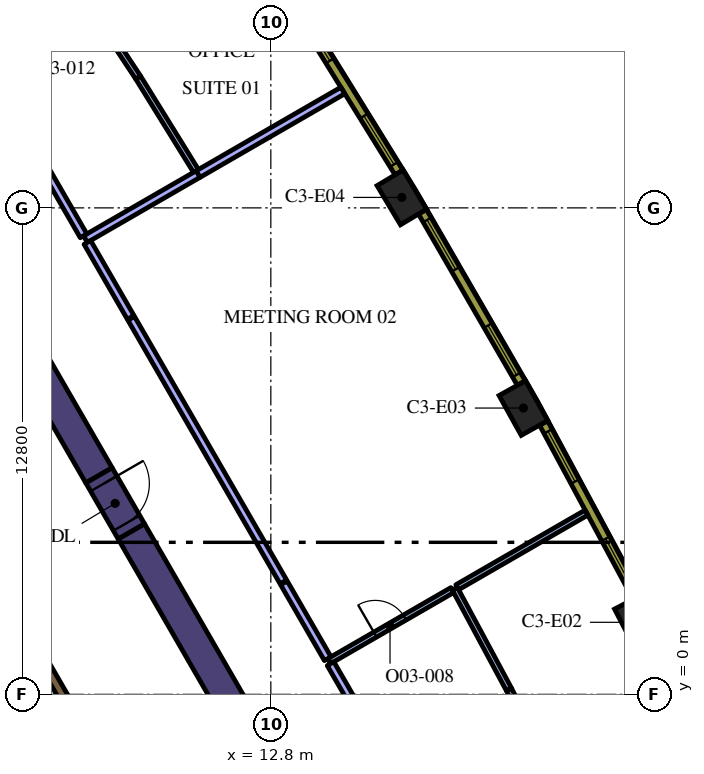
"""IFC4 building model, lengths in metres.
Left out: names, types, materials, properties, quantities, classifications, styles, units other than length and angle.
Written with IfcOpenShell. Run it as: python <this file> out.ifc"""

import sys

from ifc_helpers import new_model, si_unit, direction, frame, frame_2d, origin, origin_2d, place, context, subcontext, project, spatial, rectangle, extrude, element, fill, save


model = new_model("IFC4")
c1 = context("Model", 3, precision=1e-05, world=origin(), true_north=direction((0.0, 1.0)))
c2 = subcontext(c1, "Body", "Model", "MODEL_VIEW")
j1 = project(units=[si_unit("LENGTHUNIT", "METRE"), si_unit("PLANEANGLEUNIT", "RADIAN")], contexts=[c1])
p1 = place(None, origin())
s1 = spatial("IfcSite", under=j1, at=p1, CompositionType="ELEMENT")
p2 = place(p1, origin())
s2 = spatial("IfcBuilding", under=s1, at=p2, CompositionType="ELEMENT")
p3 = place(p2, frame((0.0, 0.0, 175.2)))
s3 = spatial("IfcBuildingStorey", under=s2, at=p3, CompositionType="ELEMENT", Elevation=175.2)
for number, where, z_axis, x_axis in (
    (1, (22.476, 1.896, 0.0), (0.0, 0.0, 1.0), (-0.46, 0.888, 0.0)),
    (2, (19.447, 7.533, 0.0), (0.0, 0.0, 1.0), (-0.487, 0.874, 0.0)),
    (3, (16.247, 13.075, 0.0), (0.0, 0.0, 1.0), (-0.513, 0.858, 0.0)),
):
    element("IfcColumn", number, at=place(p3, frame(where, z_axis=z_axis, x_axis=x_axis)), inside=s3, PredefinedType="COLUMN", context=c2, shape_type="SweptSolid", body=[
        extrude(rectangle(XDim=1.2, YDim=0.8, at=origin_2d()), origin(), (0.0, 0.0, 1.0), 4.2),
    ])
p4 = place(p3, frame((9.129, 4.289, 0.0), z_axis=(0.0, 0.0, 1.0), x_axis=(0.499995742806, -0.866027861663, 0.0)))
e4 = element("IfcWall", 4, at=p4, inside=s3, PredefinedType="SOLIDWALL", context=c2, shape_type="SweptSolid", body=[
    extrude(rectangle(XDim=12.527, YDim=0.8, at=frame_2d((6.264, 0.0))), origin(), (0.0, 0.0, 1.0), 4.2),
])
p5 = place(p3, frame((8.279, 5.761, 0.0), z_axis=(0.0, 0.0, 1.0), x_axis=(-0.500010359015, 0.866019422922, 0.0)))
e5 = element("IfcWall", 5, at=p5, inside=s3, PredefinedType="SOLIDWALL", context=c2, shape_type="SweptSolid", body=[
    extrude(rectangle(XDim=12.528, YDim=0.8, at=frame_2d((6.264, 0.0))), origin(), (0.0, 0.0, 1.0), 4.2),
])
p6 = place(p3, frame((8.565, -2.185, 0.0), z_axis=(0.0, 0.0, 1.0), x_axis=(-0.499997954832, 0.866026584559, 0.0)))
e6 = element("IfcWall", 6, at=p6, inside=s3, PredefinedType="SOLIDWALL", context=c2, shape_type="SweptSolid", body=[
    extrude(rectangle(XDim=12.35, YDim=0.25, at=frame_2d((6.175, 0.0))), origin(), (0.0, 0.0, 1.0), 4.2),
])
p7 = place(p6, frame((0.585, 0.0, 0.0)))
e7 = element("IfcOpeningElement", 7, at=p7, cuts=e6, PredefinedType="OPENING", context=c2, shape_type="SweptSolid", body=[
    extrude(rectangle(XDim=1.1, YDim=2.1, at=frame_2d((0.55, 1.05))), frame((0.0, 0.135, 0.0), z_axis=(0.0, -1.0, 0.0), x_axis=(1.0, 0.0, 0.0)), (0.0, 0.0, 1.0), 0.27),
])
p8 = place(p3, frame((8.279, 5.761, 0.0), z_axis=(0.0, 0.0, 1.0), x_axis=(0.500062241894, -0.865989465428, 0.0)))
e8 = element("IfcWall", 8, at=p8, inside=s3, PredefinedType="SOLIDWALL", context=c2, shape_type="SweptSolid", body=[
    extrude(rectangle(XDim=1.7, YDim=0.8, at=frame_2d((0.85, 0.0))), origin(), (0.0, 0.0, 1.0), 4.2),
])
p9 = place(p8, frame((0.25, 0.0, 0.0)))
e9 = element("IfcOpeningElement", 9, at=p9, cuts=e8, PredefinedType="OPENING", context=c2, shape_type="SweptSolid", body=[
    extrude(rectangle(XDim=1.2, YDim=2.1, at=frame_2d((0.6, 1.05))), frame((0.0, 0.41, 0.0), z_axis=(0.0, -1.0, 0.0), x_axis=(1.0, 0.0, 0.0)), (0.0, 0.0, 1.0), 0.82),
])
p10 = place(p3, frame((19.066, 0.129, 0.0), z_axis=(0.0, 0.0, 1.0), x_axis=(0.446215695511, -0.894925445543, 0.0)))
e10 = element("IfcWall", 10, at=p10, inside=s3, PredefinedType="PARTITIONING", context=c2, shape_type="SweptSolid", body=[
    extrude(rectangle(XDim=3.328, YDim=0.15, at=frame_2d((1.664, 0.0))), origin(), (0.0, 0.0, 1.0), 3.15),
])
p11 = place(p10, frame((1.228, 0.0, 0.0)))
e11 = element("IfcOpeningElement", 11, at=p11, cuts=e10, PredefinedType="OPENING", context=c2, shape_type="SweptSolid", body=[
    extrude(rectangle(XDim=0.9, YDim=2.1, at=frame_2d((0.45, 1.05))), frame((0.0, 0.085, 0.0), z_axis=(0.0, -1.0, 0.0), x_axis=(1.0, 0.0, 0.0)), (0.0, 0.0, 1.0), 0.17),
])
p12 = place(p3, frame((19.066, 0.129, 0.0), z_axis=(0.0, 0.0, 1.0), x_axis=(-0.473359743891, 0.88086920304, 0.0)))
e12 = element("IfcWall", 12, at=p12, inside=s3, PredefinedType="PARTITIONING", context=c2, shape_type="SweptSolid", body=[
    extrude(rectangle(XDim=3.01, YDim=0.15, at=frame_2d((1.505, 0.0))), origin(), (0.0, 0.0, 1.0), 3.15),
])
p13 = place(p3, frame((17.706, 2.819, 0.0), z_axis=(0.0, 0.0, 1.0), x_axis=(0.866023031919, 0.500004108169, 0.0)))
e13 = element("IfcWall", 13, at=p13, inside=s3, PredefinedType="PARTITIONING", context=c2, shape_type="SweptSolid", body=[
    extrude(rectangle(XDim=3.927, YDim=0.15, at=frame_2d((1.963, 0.0))), origin(), (0.0, 0.0, 1.0), 3.15),
])
p14 = place(p3, frame((14.334, 0.872, 0.0), z_axis=(0.0, 0.0, 1.0), x_axis=(0.866027010039, 0.499997217876, 0.0)))
e14 = element("IfcWall", 14, at=p14, inside=s3, PredefinedType="PARTITIONING", context=c2, shape_type="SweptSolid", body=[
    extrude(rectangle(XDim=3.743, YDim=0.15, at=frame_2d((1.872, 0.0))), origin(), (0.0, 0.0, 1.0), 3.15),
])
p15 = place(p14, frame((1.4, 0.0, 0.0)))
e15 = element("IfcOpeningElement", 15, at=p15, cuts=e14, PredefinedType="OPENING", context=c2, shape_type="SweptSolid", body=[
    extrude(rectangle(XDim=0.9, YDim=2.1, at=frame_2d((0.45, 1.05))), frame((0.0, 0.085, 0.0), z_axis=(0.0, -1.0, 0.0), x_axis=(1.0, 0.0, 0.0)), (0.0, 0.0, 1.0), 0.17),
])
p16 = place(p3, frame((18.489, -6.324, 0.0), z_axis=(0.0, 0.0, 1.0), x_axis=(-0.500003913404, 0.866023144368, 0.0)))
e16 = element("IfcWall", 16, at=p16, inside=s3, PredefinedType="PARTITIONING", context=c2, shape_type="SweptSolid", body=[
    extrude(rectangle(XDim=8.234, YDim=0.2, at=frame_2d((4.117, 0.0))), origin(), (0.0, 0.0, 1.0), 3.15),
])
p17 = place(p3, frame((10.879, 13.685, 0.0), z_axis=(0.0, 0.0, 1.0), x_axis=(0.866035177799, 0.499983070528, 0.0)))
e17 = element("IfcWall", 17, at=p17, inside=s3, PredefinedType="PARTITIONING", context=c2, shape_type="SweptSolid", body=[
    extrude(rectangle(XDim=4.406, YDim=0.2, at=frame_2d((2.203, 0.0))), origin(), (0.0, 0.0, 1.0), 3.15),
])
p18 = place(p3, frame((7.922, 11.978, 0.0), z_axis=(0.0, 0.0, 1.0), x_axis=(0.866008564848, 0.50002916476, 0.0)))
e18 = element("IfcWall", 18, at=p18, inside=s3, PredefinedType="PARTITIONING", context=c2, shape_type="SweptSolid", body=[
    extrude(rectangle(XDim=3.422, YDim=0.2, at=frame_2d((1.711, 0.0))), origin(), (0.0, 0.0, 1.0), 3.15),
])
p19 = place(p3, frame((13.13, 2.958, 0.0), z_axis=(0.0, 0.0, 1.0), x_axis=(-0.499995158272, 0.866028199139, 0.0)))
e19 = element("IfcWall", 19, at=p19, inside=s3, PredefinedType="PARTITIONING", context=c2, shape_type="SweptSolid", body=[
    extrude(rectangle(XDim=8.008, YDim=0.2, at=frame_2d((4.004, 0.0))), origin(), (0.0, 0.0, 1.0), 3.15),
])
p20 = place(p3, frame((9.111, 9.918, 0.0), z_axis=(0.0, 0.0, 1.0), x_axis=(-0.499954382462, 0.86605173948, 0.0)))
e20 = element("IfcWall", 20, at=p20, inside=s3, PredefinedType="PARTITIONING", context=c2, shape_type="SweptSolid", body=[
    extrude(rectangle(XDim=2.278, YDim=0.2, at=frame_2d((1.139, 0.0))), origin(), (0.0, 0.0, 1.0), 3.15),
])
p21 = place(p3, frame((14.297, 0.937, 0.0), z_axis=(0.0, 0.0, 1.0), x_axis=(-0.499970234539, 0.866042588199, 0.0)))
e21 = element("IfcWall", 21, at=p21, inside=s3, PredefinedType="PARTITIONING", context=c2, shape_type="SweptSolid", body=[
    extrude(rectangle(XDim=2.303, YDim=0.2, at=frame_2d((1.151, 0.0))), origin(), (0.0, 0.0, 1.0), 3.15),
])
p22 = place(p3, frame((10.83, 13.772, 0.0), z_axis=(0.0, 0.0, 1.0), x_axis=(-0.526229630206, 0.850342505284, 0.0)))
e22 = element("IfcWall", 22, at=p22, inside=s3, PredefinedType="PARTITIONING", context=c2, shape_type="SweptSolid", body=[
    extrude(rectangle(XDim=2.892, YDim=0.15, at=frame_2d((1.446, 0.0))), origin(), (0.0, 0.0, 1.0), 3.15),
])
p23 = place(p3, frame((7.461, 19.022, 0.0), z_axis=(0.0, 0.0, 1.0), x_axis=(0.551902709159, -0.833908507945, 0.0)))
e23 = element("IfcWall", 23, at=p23, inside=s3, PredefinedType="PARTITIONING", context=c2, shape_type="SweptSolid", body=[
    extrude(rectangle(XDim=3.347, YDim=0.15, at=frame_2d((1.673, 0.0))), origin(), (0.0, 0.0, 1.0), 3.15),
])
p24 = place(p23, frame((1.247, 0.0, 0.0)))
e24 = element("IfcOpeningElement", 24, at=p24, cuts=e23, PredefinedType="OPENING", context=c2, shape_type="SweptSolid", body=[
    extrude(rectangle(XDim=0.9, YDim=2.1, at=frame_2d((0.45, 1.05))), frame((0.0, 0.085, 0.0), z_axis=(0.0, -1.0, 0.0), x_axis=(1.0, 0.0, 0.0)), (0.0, 0.0, 1.0), 0.17),
])
p25 = place(p3, frame((7.872, 12.064, 0.0), z_axis=(0.0, 0.0, 1.0), x_axis=(-0.499995192696, 0.866028179265, 0.0)))
e25 = element("IfcWall", 25, at=p25, inside=s3, PredefinedType="PARTITIONING", context=c2, shape_type="SweptSolid", body=[
    extrude(rectangle(XDim=8.239, YDim=0.2, at=frame_2d((4.12, 0.0))), origin(), (0.0, 0.0, 1.0), 3.15),
])
p26 = place(p25, frame((3.6, 0.0, 0.0)))
e26 = element("IfcOpeningElement", 26, at=p26, cuts=e25, PredefinedType="OPENING", context=c2, shape_type="SweptSolid", body=[
    extrude(rectangle(XDim=1.0, YDim=2.1, at=frame_2d((0.5, 1.05))), frame((0.0, 0.11, 0.0), z_axis=(0.0, -1.0, 0.0), x_axis=(1.0, 0.0, 0.0)), (0.0, 0.0, 1.0), 0.22),
])
p27 = place(p3, frame((22.44, 2.555, 0.0), z_axis=(0.0, 0.0, 1.0), x_axis=(-0.473349833294, 0.880874528704, 0.0)))
e27 = element("IfcWall", 27, at=p27, inside=s3, PredefinedType="SOLIDWALL", context=c2, shape_type="SweptSolid", body=[
    extrude(rectangle(XDim=5.204, YDim=0.24, at=frame_2d((2.602, 0.0))), origin(), (0.0, 0.0, 1.0), 3.95),
])
p28 = place(p27, frame((0.248, 0.0, 0.9)))
e28 = element("IfcOpeningElement", 28, at=p28, cuts=e27, PredefinedType="OPENING", context=c2, shape_type="SweptSolid", body=[
    extrude(rectangle(XDim=1.5, YDim=2.55, at=frame_2d((0.75, 1.275))), frame((0.0, 0.13, 0.0), z_axis=(0.0, -1.0, 0.0), x_axis=(1.0, 0.0, 0.0)), (0.0, 0.0, 1.0), 0.26),
])
p29 = place(p27, frame((3.455, 0.0, 0.9)))
e29 = element("IfcOpeningElement", 29, at=p29, cuts=e27, PredefinedType="OPENING", context=c2, shape_type="SweptSolid", body=[
    extrude(rectangle(XDim=1.5, YDim=2.55, at=frame_2d((0.75, 1.275))), frame((0.0, 0.13, 0.0), z_axis=(0.0, -1.0, 0.0), x_axis=(1.0, 0.0, 0.0)), (0.0, 0.0, 1.0), 0.26),
])
p30 = place(p3, frame((19.391, 8.191, 0.0), z_axis=(0.0, 0.0, 1.0), x_axis=(-0.500009456303, 0.866019944116, 0.0)))
e30 = element("IfcWall", 30, at=p30, inside=s3, PredefinedType="SOLIDWALL", context=c2, shape_type="SweptSolid", body=[
    extrude(rectangle(XDim=5.204, YDim=0.24, at=frame_2d((2.602, 0.0))), origin(), (0.0, 0.0, 1.0), 3.95),
])
p31 = place(p30, frame((0.248, 0.0, 0.9)))
e31 = element("IfcOpeningElement", 31, at=p31, cuts=e30, PredefinedType="OPENING", context=c2, shape_type="SweptSolid", body=[
    extrude(rectangle(XDim=1.5, YDim=2.55, at=frame_2d((0.75, 1.275))), frame((0.0, 0.13, 0.0), z_axis=(0.0, -1.0, 0.0), x_axis=(1.0, 0.0, 0.0)), (0.0, 0.0, 1.0), 0.26),
])
p32 = place(p30, frame((3.455, 0.0, 0.9)))
e32 = element("IfcOpeningElement", 32, at=p32, cuts=e30, PredefinedType="OPENING", context=c2, shape_type="SweptSolid", body=[
    extrude(rectangle(XDim=1.5, YDim=2.55, at=frame_2d((0.75, 1.275))), frame((0.0, 0.13, 0.0), z_axis=(0.0, -1.0, 0.0), x_axis=(1.0, 0.0, 0.0)), (0.0, 0.0, 1.0), 0.26),
])
p33 = place(p3, frame((16.171, 13.731, 0.0), z_axis=(0.0, 0.0, 1.0), x_axis=(-0.526197926587, 0.850362124072, 0.0)))
e33 = element("IfcWall", 33, at=p33, inside=s3, PredefinedType="SOLIDWALL", context=c2, shape_type="SweptSolid", body=[
    extrude(rectangle(XDim=5.203, YDim=0.24, at=frame_2d((2.602, 0.0))), origin(), (0.0, 0.0, 1.0), 3.95),
])
p34 = place(p33, frame((0.248, 0.0, 0.9)))
e34 = element("IfcOpeningElement", 34, at=p34, cuts=e33, PredefinedType="OPENING", context=c2, shape_type="SweptSolid", body=[
    extrude(rectangle(XDim=1.5, YDim=2.55, at=frame_2d((0.75, 1.275))), frame((0.0, 0.13, 0.0), z_axis=(0.0, -1.0, 0.0), x_axis=(1.0, 0.0, 0.0)), (0.0, 0.0, 1.0), 0.26),
])
p35 = place(p33, frame((3.455, 0.0, 0.9)))
e35 = element("IfcOpeningElement", 35, at=p35, cuts=e33, PredefinedType="OPENING", context=c2, shape_type="SweptSolid", body=[
    extrude(rectangle(XDim=1.5, YDim=2.55, at=frame_2d((0.75, 1.275))), frame((0.0, 0.13, 0.0), z_axis=(0.0, -1.0, 0.0), x_axis=(1.0, 0.0, 0.0)), (0.0, 0.0, 1.0), 0.26),
])
p36 = place(p9, origin())
e36 = element("IfcDoor", 36, at=p36, inside=s3, OperationType="SINGLE_SWING_LEFT", PredefinedType="DOOR", context=c2, shape_type="SweptSolid", body=[
    extrude(rectangle(XDim=1.2, YDim=2.1, at=frame_2d((0.6, 1.05))), frame((0.0, 0.025, 0.0), z_axis=(0.0, -1.0, 0.0), x_axis=(1.0, 0.0, 0.0)), (0.0, 0.0, 1.0), 0.05),
])
fill(e9, e36)
p37 = place(p15, origin())
e37 = element("IfcDoor", 37, at=p37, inside=s3, OperationType="SINGLE_SWING_LEFT", PredefinedType="DOOR", context=c2, shape_type="SweptSolid", body=[
    extrude(rectangle(XDim=0.9, YDim=2.1, at=frame_2d((0.45, 1.05))), frame((0.0, 0.025, 0.0), z_axis=(0.0, -1.0, 0.0), x_axis=(1.0, 0.0, 0.0)), (0.0, 0.0, 1.0), 0.05),
])
fill(e15, e37)
p38 = place(p28, origin())
e38 = element("IfcWindow", 38, at=p38, inside=s3, PartitioningType="SINGLE_PANEL", PredefinedType="WINDOW", context=c2, shape_type="SweptSolid", body=[
    extrude(rectangle(XDim=1.5, YDim=2.55, at=frame_2d((0.75, 1.275))), frame((0.0, 0.04, 0.0), z_axis=(0.0, -1.0, 0.0), x_axis=(1.0, 0.0, 0.0)), (0.0, 0.0, 1.0), 0.06),
])
fill(e28, e38)
p39 = place(p29, origin())
e39 = element("IfcWindow", 39, at=p39, inside=s3, PartitioningType="SINGLE_PANEL", PredefinedType="WINDOW", context=c2, shape_type="SweptSolid", body=[
    extrude(rectangle(XDim=1.5, YDim=2.55, at=frame_2d((0.75, 1.275))), frame((0.0, 0.04, 0.0), z_axis=(0.0, -1.0, 0.0), x_axis=(1.0, 0.0, 0.0)), (0.0, 0.0, 1.0), 0.06),
])
fill(e29, e39)
p40 = place(p31, origin())
e40 = element("IfcWindow", 40, at=p40, inside=s3, PartitioningType="SINGLE_PANEL", PredefinedType="WINDOW", context=c2, shape_type="SweptSolid", body=[
    extrude(rectangle(XDim=1.5, YDim=2.55, at=frame_2d((0.75, 1.275))), frame((0.0, 0.04, 0.0), z_axis=(0.0, -1.0, 0.0), x_axis=(1.0, 0.0, 0.0)), (0.0, 0.0, 1.0), 0.06),
])
fill(e31, e40)
p41 = place(p32, origin())
e41 = element("IfcWindow", 41, at=p41, inside=s3, PartitioningType="SINGLE_PANEL", PredefinedType="WINDOW", context=c2, shape_type="SweptSolid", body=[
    extrude(rectangle(XDim=1.5, YDim=2.55, at=frame_2d((0.75, 1.275))), frame((0.0, 0.04, 0.0), z_axis=(0.0, -1.0, 0.0), x_axis=(1.0, 0.0, 0.0)), (0.0, 0.0, 1.0), 0.06),
])
fill(e32, e41)
p42 = place(p34, origin())
e42 = element("IfcWindow", 42, at=p42, inside=s3, PartitioningType="SINGLE_PANEL", PredefinedType="WINDOW", context=c2, shape_type="SweptSolid", body=[
    extrude(rectangle(XDim=1.5, YDim=2.55, at=frame_2d((0.75, 1.275))), frame((0.0, 0.04, 0.0), z_axis=(0.0, -1.0, 0.0), x_axis=(1.0, 0.0, 0.0)), (0.0, 0.0, 1.0), 0.06),
])
fill(e34, e42)
p43 = place(p35, origin())
e43 = element("IfcWindow", 43, at=p43, inside=s3, PartitioningType="SINGLE_PANEL", PredefinedType="WINDOW", context=c2, shape_type="SweptSolid", body=[
    extrude(rectangle(XDim=1.5, YDim=2.55, at=frame_2d((0.75, 1.275))), frame((0.0, 0.04, 0.0), z_axis=(0.0, -1.0, 0.0), x_axis=(1.0, 0.0, 0.0)), (0.0, 0.0, 1.0), 0.06),
])
fill(e35, e43)
save(model, sys.argv[1])
